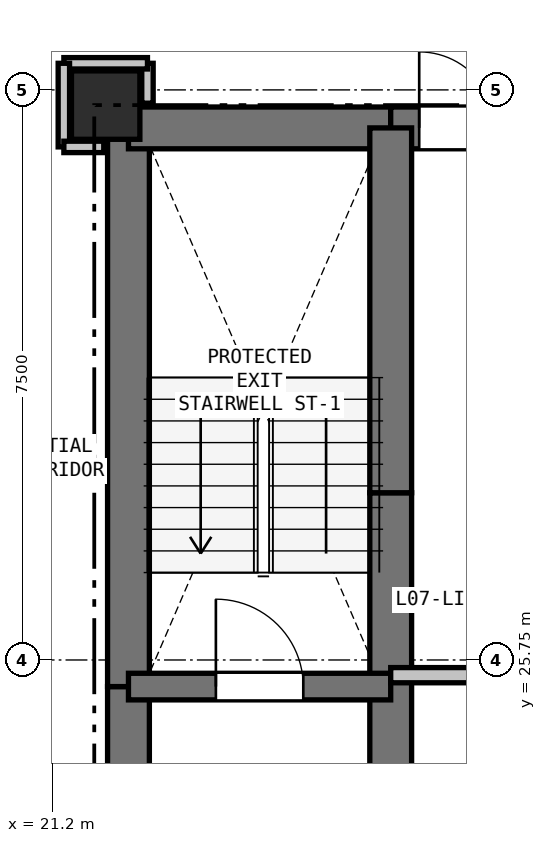
"""IFC4 building model, lengths in metres.
Left out: names, types, materials, properties, quantities, classifications, styles, units other than length and angle.
Written with IfcOpenShell. Run it as: python <this file> out.ifc"""

import sys

from ifc_helpers import new_model, si_unit, direction, frame, frame_2d, origin, origin_2d, place, context, subcontext, project, spatial, rectangle, extrude, element, fill, save


model = new_model("IFC4")
c1 = context("Model", 3, precision=1e-05, world=origin(), true_north=direction((0.0, 1.0)))
c2 = subcontext(c1, "Body", "Model", "MODEL_VIEW")
j1 = project(units=[si_unit("LENGTHUNIT", "METRE"), si_unit("PLANEANGLEUNIT", "RADIAN")], contexts=[c1])
p1 = place(None, origin())
s1 = spatial("IfcSite", under=j1, at=p1, CompositionType="ELEMENT")
p2 = place(p1, origin())
s2 = spatial("IfcBuilding", under=s1, at=p2, CompositionType="ELEMENT")
p3 = place(p2, frame((0.0, 0.0, 29.1)))
s3 = spatial("IfcBuildingStorey", under=s2, at=p3, CompositionType="ELEMENT", Elevation=29.1)
p4 = place(p3, frame((21.9, 33.05, 0.0), z_axis=(0.0, 0.0, 1.0), x_axis=(1.0, 0.0, 0.0)))
e1 = element("IfcColumn", 1, at=p4, inside=s3, PredefinedType="COLUMN", context=c2, shape_type="SweptSolid", body=[
    extrude(rectangle(XDim=0.9, YDim=0.9, at=origin_2d()), origin(), (0.0, 0.0, 1.0), 3.3),
])
p5 = place(p3, frame((22.2, 20.75, 0.0), z_axis=(0.0, 0.0, 1.0), x_axis=(0.0, 1.0, 0.0)))
e2 = element("IfcWall", 2, at=p5, inside=s3, PredefinedType="SHEAR", context=c2, shape_type="SweptSolid", body=[
    extrude(rectangle(XDim=4.65, YDim=0.55, at=frame_2d((2.325, 0.0))), origin(), (0.0, 0.0, 1.0), 3.04),
])
p6 = place(p3, frame((22.2, 25.4, 0.0), z_axis=(0.0, 0.0, 1.0), x_axis=(0.0, 1.0, 0.0)))
e3 = element("IfcWall", 3, at=p6, inside=s3, PredefinedType="SHEAR", context=c2, shape_type="SweptSolid", body=[
    extrude(rectangle(XDim=7.35, YDim=0.55, at=frame_2d((3.675, 0.0))), origin(), (0.0, 0.0, 1.0), 3.04),
])
p7 = place(p3, frame((22.2, 32.75, 0.0), z_axis=(0.0, 0.0, 1.0), x_axis=(1.0, 0.0, 0.0)))
e4 = element("IfcWall", 4, at=p7, inside=s3, PredefinedType="SHEAR", context=c2, shape_type="SweptSolid", body=[
    extrude(rectangle(XDim=3.45, YDim=0.55, at=frame_2d((1.725, 0.0))), origin(), (0.0, 0.0, 1.0), 3.04),
])
p8 = place(p3, frame((25.65, 32.75, 0.0), z_axis=(0.0, 0.0, 1.0), x_axis=(1.0, 0.0, 0.0)))
e5 = element("IfcWall", 5, at=p8, inside=s3, PredefinedType="SHEAR", context=c2, shape_type="SweptSolid", body=[
    extrude(rectangle(XDim=1.75, YDim=0.55, at=frame_2d((0.875, 0.0))), origin(), (0.0, 0.0, 1.0), 3.04),
])
p9 = place(p8, frame((0.375, 0.0, 0.0)))
e6 = element("IfcOpeningElement", 6, at=p9, cuts=e5, PredefinedType="OPENING", context=c2, shape_type="SweptSolid", body=[
    extrude(rectangle(XDim=1.0, YDim=2.15, at=frame_2d((0.5, 1.075))), frame((0.0, 0.285, 0.0), z_axis=(0.0, -1.0, 0.0), x_axis=(1.0, 0.0, 0.0)), (0.0, 0.0, 1.0), 0.57),
])
p10 = place(p3, frame((25.65, 22.75, 0.0), z_axis=(0.0, 0.0, 1.0), x_axis=(0.0, 1.0, 0.0)))
e7 = element("IfcWall", 7, at=p10, inside=s3, PredefinedType="SHEAR", context=c2, shape_type="SweptSolid", body=[
    extrude(rectangle(XDim=2.8, YDim=0.55, at=frame_2d((1.4, 0.0))), origin(), (0.0, 0.0, 1.0), 3.04),
])
p11 = place(p3, frame((25.65, 25.55, 0.0), z_axis=(0.0, 0.0, 1.0), x_axis=(0.0, 1.0, 0.0)))
e8 = element("IfcWall", 8, at=p11, inside=s3, PredefinedType="SHEAR", context=c2, shape_type="SweptSolid", body=[
    extrude(rectangle(XDim=2.4, YDim=0.55, at=frame_2d((1.2, 0.0))), origin(), (0.0, 0.0, 1.0), 3.04),
])
p12 = place(p3, frame((25.65, 27.95, 0.0), z_axis=(0.0, 0.0, 1.0), x_axis=(0.0, 1.0, 0.0)))
e9 = element("IfcWall", 9, at=p12, inside=s3, PredefinedType="SHEAR", context=c2, shape_type="SweptSolid", body=[
    extrude(rectangle(XDim=4.8, YDim=0.55, at=frame_2d((2.4, 0.0))), origin(), (0.0, 0.0, 1.0), 3.04),
])
p13 = place(p3, frame((22.2, 25.4, 0.0), z_axis=(0.0, 0.0, 1.0), x_axis=(1.0, 0.0, 0.0)))
e10 = element("IfcWall", 10, at=p13, inside=s3, PredefinedType="SHEAR", context=c2, shape_type="SweptSolid", body=[
    extrude(rectangle(XDim=3.45, YDim=0.35, at=frame_2d((1.725, 0.0))), origin(), (0.0, 0.0, 1.0), 3.04),
])
p14 = place(p13, frame((1.15, 0.0, 0.0)))
e11 = element("IfcOpeningElement", 11, at=p14, cuts=e10, PredefinedType="OPENING", context=c2, shape_type="SweptSolid", body=[
    extrude(rectangle(XDim=1.15, YDim=2.15, at=frame_2d((0.575, 1.075))), frame((0.0, 0.185, 0.0), z_axis=(0.0, -1.0, 0.0), x_axis=(1.0, 0.0, 0.0)), (0.0, 0.0, 1.0), 0.37),
])
p15 = place(p3, frame((25.65, 25.55, 0.0), z_axis=(0.0, 0.0, 1.0), x_axis=(1.0, 0.0, 0.0)))
e12 = element("IfcWall", 12, at=p15, inside=s3, PredefinedType="PARTITIONING", context=c2, shape_type="SweptSolid", body=[
    extrude(rectangle(XDim=4.95, YDim=0.2, at=frame_2d((2.475, 0.0))), origin(), (0.0, 0.0, 1.0), 3.04),
])
p16 = place(p3, frame((22.45, 33.075, 0.0), z_axis=(0.0, 0.0, 1.0), x_axis=(0.0, 1.0, 0.0)))
e13 = element("IfcWall", 13, at=p16, inside=s3, PredefinedType="PARTITIONING", context=c2, shape_type="SweptSolid", body=[
    extrude(rectangle(XDim=0.525, YDim=0.15, at=frame_2d((0.263, 0.0))), origin(), (0.0, 0.0, 1.0), 2.488),
])
p17 = place(p3, frame((22.45, 33.6, 0.0), z_axis=(0.0, 0.0, 1.0), x_axis=(-1.0, 0.0, 0.0)))
e14 = element("IfcWall", 14, at=p17, inside=s3, PredefinedType="PARTITIONING", context=c2, shape_type="SweptSolid", body=[
    extrude(rectangle(XDim=1.1, YDim=0.15, at=frame_2d((0.55, 0.0))), origin(), (0.0, 0.0, 1.0), 3.04),
])
p18 = place(p3, frame((21.35, 33.6, 0.0), z_axis=(0.0, 0.0, 1.0), x_axis=(0.0, -1.0, 0.0)))
e15 = element("IfcWall", 15, at=p18, inside=s3, PredefinedType="PARTITIONING", context=c2, shape_type="SweptSolid", body=[
    extrude(rectangle(XDim=1.1, YDim=0.15, at=frame_2d((0.55, 0.0))), origin(), (0.0, 0.0, 1.0), 2.337),
])
p19 = place(p3, frame((21.35, 32.5, 0.0), z_axis=(0.0, 0.0, 1.0), x_axis=(1.0, 0.0, 0.0)))
e16 = element("IfcWall", 16, at=p19, inside=s3, PredefinedType="PARTITIONING", context=c2, shape_type="SweptSolid", body=[
    extrude(rectangle(XDim=0.525, YDim=0.15, at=frame_2d((0.262, 0.0))), origin(), (0.0, 0.0, 1.0), 2.488),
])
p20 = place(p9, origin())
e17 = element("IfcDoor", 17, at=p20, inside=s3, OperationType="SINGLE_SWING_LEFT", PredefinedType="DOOR", context=c2, shape_type="SweptSolid", body=[
    extrude(rectangle(XDim=1.0, YDim=2.15, at=frame_2d((0.5, 1.075))), frame((0.0, 0.025, 0.0), z_axis=(0.0, -1.0, 0.0), x_axis=(1.0, 0.0, 0.0)), (0.0, 0.0, 1.0), 0.05),
])
fill(e6, e17)
p21 = place(p14, origin())
e18 = element("IfcDoor", 18, at=p21, inside=s3, OperationType="SINGLE_SWING_LEFT", PredefinedType="DOOR", context=c2, shape_type="SweptSolid", body=[
    extrude(rectangle(XDim=1.15, YDim=2.15, at=frame_2d((0.575, 1.075))), frame((0.0, 0.025, 0.0), z_axis=(0.0, -1.0, 0.0), x_axis=(1.0, 0.0, 0.0)), (0.0, 0.0, 1.0), 0.05),
])
fill(e11, e18)
save(model, sys.argv[1])
